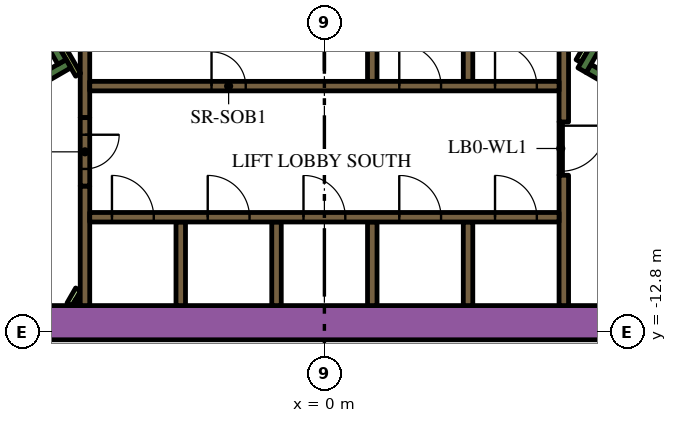
"""IFC4 building model, lengths in metres.
Left out: names, types, materials, properties, quantities, classifications, styles, units other than length and angle.
Written with IfcOpenShell. Run it as: python <this file> out.ifc"""

import sys

from ifc_helpers import new_model, si_unit, direction, frame, frame_2d, origin, place, context, subcontext, project, spatial, rectangle, extrude, element, fill, save


model = new_model("IFC4")
c1 = context("Model", 3, precision=1e-05, world=origin(), true_north=direction((0.0, 1.0)))
c2 = subcontext(c1, "Body", "Model", "MODEL_VIEW")
j1 = project(units=[si_unit("LENGTHUNIT", "METRE"), si_unit("PLANEANGLEUNIT", "RADIAN")], contexts=[c1])
p1 = place(None, origin())
s1 = spatial("IfcSite", under=j1, at=p1, CompositionType="ELEMENT")
p2 = place(p1, origin())
s2 = spatial("IfcBuilding", under=s1, at=p2, CompositionType="ELEMENT")
p3 = place(p2, frame((0.0, 0.0, 87.6)))
s3 = spatial("IfcBuildingStorey", under=s2, at=p3, CompositionType="ELEMENT", Elevation=87.6)
p4 = place(p3, frame((-12.019, -12.55, 0.0), z_axis=(0.0, 0.0, 1.0), x_axis=(1.0, 0.0, 0.0)))
e1 = element("IfcWall", 1, at=p4, inside=s3, PredefinedType="SOLIDWALL", context=c2, shape_type="SweptSolid", body=[
    extrude(rectangle(XDim=21.63, YDim=0.9, at=frame_2d((10.815, 0.0))), origin(), (0.0, 0.0, 1.0), 3.9),
])
p5 = place(p3, frame((12.84, -9.261, 0.0), z_axis=(0.0, 0.0, 1.0), x_axis=(-0.866013990052, 0.500019768644, 0.0)))
e2 = element("IfcWall", 2, at=p5, inside=s3, PredefinedType="SOLIDWALL", context=c2, shape_type="SweptSolid", body=[
    extrude(rectangle(XDim=6.8, YDim=0.25, at=frame_2d((3.4, 0.0))), origin(), (0.0, 0.0, 1.0), 3.9),
])
p6 = place(p3, frame((6.78, -5.906, 0.0), z_axis=(0.0, 0.0, 1.0), x_axis=(0.500223362819, 0.865896406789, 0.0)))
e3 = element("IfcWall", 3, at=p6, inside=s3, PredefinedType="SOLIDWALL", context=c2, shape_type="SweptSolid", body=[
    extrude(rectangle(XDim=0.675, YDim=0.25, at=frame_2d((0.337, 0.0))), origin(), (0.0, 0.0, 1.0), 3.9),
])
p7 = place(p3, frame((-12.84, -9.261, 0.0), z_axis=(0.0, 0.0, 1.0), x_axis=(0.866016039709, 0.500016218704, 0.0)))
e4 = element("IfcWall", 4, at=p7, inside=s3, PredefinedType="SOLIDWALL", context=c2, shape_type="SweptSolid", body=[
    extrude(rectangle(XDim=7.05, YDim=0.25, at=frame_2d((3.525, 0.0))), origin(), (0.0, 0.0, 1.0), 3.9),
])
p8 = place(p3, frame((-6.905, -5.69, 0.0), z_axis=(0.0, 0.0, 1.0), x_axis=(-0.500402024738, 0.865793170242, 0.0)))
e5 = element("IfcWall", 5, at=p8, inside=s3, PredefinedType="SOLIDWALL", context=c2, shape_type="SweptSolid", body=[
    extrude(rectangle(XDim=0.425, YDim=0.25, at=frame_2d((0.212, 0.0))), origin(), (0.0, 0.0, 1.0), 3.9),
])
p9 = place(p3, frame((-3.78, -12.1, 0.0), z_axis=(0.0, 0.0, 1.0), x_axis=(0.0, 1.0, 0.0)))
e6 = element("IfcWall", 6, at=p9, inside=s3, PredefinedType="SOLIDWALL", context=c2, shape_type="SweptSolid", body=[
    extrude(rectangle(XDim=2.2, YDim=0.25, at=frame_2d((1.1, 0.0))), origin(), (0.0, 0.0, 1.0), 3.9),
])
p10 = place(p3, frame((-6.3, -12.1, 0.0), z_axis=(0.0, 0.0, 1.0), x_axis=(0.0, 1.0, 0.0)))
e7 = element("IfcWall", 7, at=p10, inside=s3, PredefinedType="SOLIDWALL", context=c2, shape_type="SweptSolid", body=[
    extrude(rectangle(XDim=3.146, YDim=0.25, at=frame_2d((1.573, 0.0))), origin(), (0.0, 0.0, 1.0), 3.9),
])
p11 = place(p3, frame((6.3, -8.67, 0.0), z_axis=(0.0, 0.0, 1.0), x_axis=(0.0, -1.0, 0.0)))
e8 = element("IfcWall", 8, at=p11, inside=s3, PredefinedType="SOLIDWALL", context=c2, shape_type="SweptSolid", body=[
    extrude(rectangle(XDim=3.43, YDim=0.25, at=frame_2d((1.715, 0.0))), origin(), (0.0, 0.0, 1.0), 3.9),
])
p12 = place(p3, frame((6.3, -7.268, 0.0), z_axis=(0.0, 0.0, 1.0), x_axis=(0.0, 1.0, 0.0)))
e9 = element("IfcWall", 9, at=p12, inside=s3, PredefinedType="SOLIDWALL", context=c2, shape_type="SweptSolid", body=[
    extrude(rectangle(XDim=3.268, YDim=0.25, at=frame_2d((1.634, 0.0))), origin(), (0.0, 0.0, 1.0), 3.9),
])
for number, where, z_axis, x_axis in (
    (10, (3.78, -4.0, 0.0), (0.0, 0.0, 1.0), (0.0, -1.0, 0.0)),
    (11, (1.26, -4.0, 0.0), (0.0, 0.0, 1.0), (0.0, -1.0, 0.0)),
):
    element("IfcWall", number, at=place(p3, frame(where, z_axis=z_axis, x_axis=x_axis)), inside=s3, PredefinedType="SOLIDWALL", context=c2, shape_type="SweptSolid", body=[
        extrude(rectangle(XDim=2.2, YDim=0.25, at=frame_2d((1.1, 0.0))), origin(), (0.0, 0.0, 1.0), 3.9),
    ])
p13 = place(p3, frame((-6.3, -4.0, 0.0), z_axis=(0.0, 0.0, 1.0), x_axis=(0.0, -1.0, 0.0)))
e12 = element("IfcWall", 12, at=p13, inside=s3, PredefinedType="SOLIDWALL", context=c2, shape_type="SweptSolid", body=[
    extrude(rectangle(XDim=3.154, YDim=0.25, at=frame_2d((1.577, 0.0))), origin(), (0.0, 0.0, 1.0), 3.9),
])
for number, where, z_axis, x_axis in (
    (13, (3.78, -12.1, 0.0), (0.0, 0.0, 1.0), (0.0, 1.0, 0.0)),
    (14, (1.26, -12.1, 0.0), (0.0, 0.0, 1.0), (0.0, 1.0, 0.0)),
    (15, (-1.26, -12.1, 0.0), (0.0, 0.0, 1.0), (0.0, 1.0, 0.0)),
):
    element("IfcWall", number, at=place(p3, frame(where, z_axis=z_axis, x_axis=x_axis)), inside=s3, PredefinedType="SOLIDWALL", context=c2, shape_type="SweptSolid", body=[
        extrude(rectangle(XDim=2.2, YDim=0.25, at=frame_2d((1.1, 0.0))), origin(), (0.0, 0.0, 1.0), 3.9),
    ])
p14 = place(p3, frame((-6.708, -12.068, 0.0), z_axis=(0.0, 0.0, 1.0), x_axis=(0.500000789788, 0.8660249478, 0.0)))
e16 = element("IfcWall", 16, at=p14, inside=s3, PredefinedType="PARTITIONING", context=c2, shape_type="SweptSolid", body=[
    extrude(rectangle(XDim=0.456, YDim=0.15, at=frame_2d((0.228, 0.0))), origin(), (0.0, 0.0, 1.0), 2.75),
])
p15 = place(p3, frame((-6.534, -12.068, 0.0), z_axis=(0.0, 0.0, 1.0), x_axis=(0.500240224089, 0.865886665912, 0.0)))
e17 = element("IfcWall", 17, at=p15, inside=s3, PredefinedType="PARTITIONING", context=c2, shape_type="SweptSolid", body=[
    extrude(rectangle(XDim=0.109, YDim=0.15, at=frame_2d((0.054, 0.0))), origin(), (0.0, 0.0, 1.0), 2.75),
])
p16 = place(p3, frame((-6.48, -6.027, 0.0), z_axis=(0.0, 0.0, 1.0), x_axis=(-0.499927229454, 0.866067413802, 0.0)))
e18 = element("IfcWall", 18, at=p16, inside=s3, PredefinedType="PARTITIONING", context=c2, shape_type="SweptSolid", body=[
    extrude(rectangle(XDim=0.929, YDim=0.15, at=frame_2d((0.464, 0.0))), origin(), (0.0, 0.0, 1.0), 3.9),
])
p17 = place(p3, frame((6.945, -5.222, 0.0), z_axis=(0.0, 0.0, 1.0), x_axis=(-0.499818422106, -0.866130212453, 0.0)))
e19 = element("IfcWall", 19, at=p17, inside=s3, PredefinedType="PARTITIONING", context=c2, shape_type="SweptSolid", body=[
    extrude(rectangle(XDim=0.514, YDim=0.15, at=frame_2d((0.257, 0.0))), origin(), (0.0, 0.0, 1.0), 2.75),
])
p18 = place(p3, frame((-6.175, -9.775, 0.0), z_axis=(0.0, 0.0, 1.0), x_axis=(1.0, 0.0, 0.0)))
e20 = element("IfcWall", 20, at=p18, inside=s3, PredefinedType="SOLIDWALL", context=c2, shape_type="SweptSolid", body=[
    extrude(rectangle(XDim=12.35, YDim=0.25, at=frame_2d((6.175, 0.0))), origin(), (0.0, 0.0, 1.0), 3.9),
])
p19 = place(p18, frame((0.585, 0.0, 0.0)))
e21 = element("IfcOpeningElement", 21, at=p19, cuts=e20, PredefinedType="OPENING", context=c2, shape_type="SweptSolid", body=[
    extrude(rectangle(XDim=1.1, YDim=2.1, at=frame_2d((0.55, 1.05))), frame((0.0, 0.135, 0.0), z_axis=(0.0, -1.0, 0.0), x_axis=(1.0, 0.0, 0.0)), (0.0, 0.0, 1.0), 0.27),
])
p20 = place(p18, frame((3.105, 0.0, 0.0)))
e22 = element("IfcOpeningElement", 22, at=p20, cuts=e20, PredefinedType="OPENING", context=c2, shape_type="SweptSolid", body=[
    extrude(rectangle(XDim=1.1, YDim=2.1, at=frame_2d((0.55, 1.05))), frame((0.0, 0.135, 0.0), z_axis=(0.0, -1.0, 0.0), x_axis=(1.0, 0.0, 0.0)), (0.0, 0.0, 1.0), 0.27),
])
p21 = place(p18, frame((5.625, 0.0, 0.0)))
e23 = element("IfcOpeningElement", 23, at=p21, cuts=e20, PredefinedType="OPENING", context=c2, shape_type="SweptSolid", body=[
    extrude(rectangle(XDim=1.1, YDim=2.1, at=frame_2d((0.55, 1.05))), frame((0.0, 0.135, 0.0), z_axis=(0.0, -1.0, 0.0), x_axis=(1.0, 0.0, 0.0)), (0.0, 0.0, 1.0), 0.27),
])
p22 = place(p18, frame((8.145, 0.0, 0.0)))
e24 = element("IfcOpeningElement", 24, at=p22, cuts=e20, PredefinedType="OPENING", context=c2, shape_type="SweptSolid", body=[
    extrude(rectangle(XDim=1.1, YDim=2.1, at=frame_2d((0.55, 1.05))), frame((0.0, 0.135, 0.0), z_axis=(0.0, -1.0, 0.0), x_axis=(1.0, 0.0, 0.0)), (0.0, 0.0, 1.0), 0.27),
])
p23 = place(p18, frame((10.665, 0.0, 0.0)))
e25 = element("IfcOpeningElement", 25, at=p23, cuts=e20, PredefinedType="OPENING", context=c2, shape_type="SweptSolid", body=[
    extrude(rectangle(XDim=1.1, YDim=2.1, at=frame_2d((0.55, 1.05))), frame((0.0, 0.135, 0.0), z_axis=(0.0, -1.0, 0.0), x_axis=(1.0, 0.0, 0.0)), (0.0, 0.0, 1.0), 0.27),
])
p24 = place(p3, frame((-6.175, -6.325, 0.0), z_axis=(0.0, 0.0, 1.0), x_axis=(1.0, 0.0, 0.0)))
e26 = element("IfcWall", 26, at=p24, inside=s3, PredefinedType="SOLIDWALL", context=c2, shape_type="SweptSolid", body=[
    extrude(rectangle(XDim=12.35, YDim=0.25, at=frame_2d((6.175, 0.0))), origin(), (0.0, 0.0, 1.0), 3.9),
])
p25 = place(p24, frame((3.205, 0.0, 0.0)))
e27 = element("IfcOpeningElement", 27, at=p25, cuts=e26, PredefinedType="OPENING", context=c2, shape_type="SweptSolid", body=[
    extrude(rectangle(XDim=0.9, YDim=2.1, at=frame_2d((0.45, 1.05))), frame((0.0, 0.135, 0.0), z_axis=(0.0, -1.0, 0.0), x_axis=(1.0, 0.0, 0.0)), (0.0, 0.0, 1.0), 0.27),
])
p26 = place(p24, frame((8.145, 0.0, 0.0)))
e28 = element("IfcOpeningElement", 28, at=p26, cuts=e26, PredefinedType="OPENING", context=c2, shape_type="SweptSolid", body=[
    extrude(rectangle(XDim=1.1, YDim=2.1, at=frame_2d((0.55, 1.05))), frame((0.0, 0.135, 0.0), z_axis=(0.0, -1.0, 0.0), x_axis=(1.0, 0.0, 0.0)), (0.0, 0.0, 1.0), 0.27),
])
p27 = place(p24, frame((10.665, 0.0, 0.0)))
e29 = element("IfcOpeningElement", 29, at=p27, cuts=e26, PredefinedType="OPENING", context=c2, shape_type="SweptSolid", body=[
    extrude(rectangle(XDim=1.1, YDim=2.1, at=frame_2d((0.55, 1.05))), frame((0.0, 0.135, 0.0), z_axis=(0.0, -1.0, 0.0), x_axis=(1.0, 0.0, 0.0)), (0.0, 0.0, 1.0), 0.27),
])
p28 = place(p3, frame((-6.3, -7.154, 0.0), z_axis=(0.0, 0.0, 1.0), x_axis=(0.0, -1.0, 0.0)))
e30 = element("IfcWall", 30, at=p28, inside=s3, PredefinedType="SOLIDWALL", context=c2, shape_type="SweptSolid", body=[
    extrude(rectangle(XDim=1.8, YDim=0.25, at=frame_2d((0.9, 0.0))), origin(), (0.0, 0.0, 1.0), 3.9),
])
p29 = place(p28, frame((0.45, 0.0, 0.0)))
e31 = element("IfcOpeningElement", 31, at=p29, cuts=e30, PredefinedType="OPENING", context=c2, shape_type="SweptSolid", body=[
    extrude(rectangle(XDim=0.9, YDim=2.1, at=frame_2d((0.45, 1.05))), frame((0.0, 0.135, 0.0), z_axis=(0.0, -1.0, 0.0), x_axis=(1.0, 0.0, 0.0)), (0.0, 0.0, 1.0), 0.27),
])
p30 = place(p3, frame((6.22, -7.266, 0.0), z_axis=(0.0, 0.0, 1.0), x_axis=(0.0, -1.0, 0.0)))
e32 = element("IfcWall", 32, at=p30, inside=s3, PredefinedType="PARTITIONING", context=c2, shape_type="SweptSolid", body=[
    extrude(rectangle(XDim=1.4, YDim=0.09, at=frame_2d((0.7, 0.0))), origin(), (0.0, 0.0, 1.0), 2.75),
])
p31 = place(p30, frame((0.1, 0.0, 0.0)))
e33 = element("IfcOpeningElement", 33, at=p31, cuts=e32, PredefinedType="OPENING", context=c2, shape_type="SweptSolid", body=[
    extrude(rectangle(XDim=1.2, YDim=2.1, at=frame_2d((0.6, 1.05))), frame((0.0, 0.055, 0.0), z_axis=(0.0, -1.0, 0.0), x_axis=(1.0, 0.0, 0.0)), (0.0, 0.0, 1.0), 0.11),
])
p32 = place(p19, origin())
e34 = element("IfcDoor", 34, at=p32, inside=s3, OperationType="DOUBLE_DOOR_SLIDING", PredefinedType="DOOR", context=c2, shape_type="SweptSolid", body=[
    extrude(rectangle(XDim=1.1, YDim=2.1, at=frame_2d((0.55, 1.05))), frame((0.0, 0.025, 0.0), z_axis=(0.0, -1.0, 0.0), x_axis=(1.0, 0.0, 0.0)), (0.0, 0.0, 1.0), 0.05),
])
fill(e21, e34)
p33 = place(p20, origin())
e35 = element("IfcDoor", 35, at=p33, inside=s3, OperationType="DOUBLE_DOOR_SLIDING", PredefinedType="DOOR", context=c2, shape_type="SweptSolid", body=[
    extrude(rectangle(XDim=1.1, YDim=2.1, at=frame_2d((0.55, 1.05))), frame((0.0, 0.025, 0.0), z_axis=(0.0, -1.0, 0.0), x_axis=(1.0, 0.0, 0.0)), (0.0, 0.0, 1.0), 0.05),
])
fill(e22, e35)
p34 = place(p21, origin())
e36 = element("IfcDoor", 36, at=p34, inside=s3, OperationType="DOUBLE_DOOR_SLIDING", PredefinedType="DOOR", context=c2, shape_type="SweptSolid", body=[
    extrude(rectangle(XDim=1.1, YDim=2.1, at=frame_2d((0.55, 1.05))), frame((0.0, 0.025, 0.0), z_axis=(0.0, -1.0, 0.0), x_axis=(1.0, 0.0, 0.0)), (0.0, 0.0, 1.0), 0.05),
])
fill(e23, e36)
p35 = place(p22, origin())
e37 = element("IfcDoor", 37, at=p35, inside=s3, OperationType="DOUBLE_DOOR_SLIDING", PredefinedType="DOOR", context=c2, shape_type="SweptSolid", body=[
    extrude(rectangle(XDim=1.1, YDim=2.1, at=frame_2d((0.55, 1.05))), frame((0.0, 0.025, 0.0), z_axis=(0.0, -1.0, 0.0), x_axis=(1.0, 0.0, 0.0)), (0.0, 0.0, 1.0), 0.05),
])
fill(e24, e37)
p36 = place(p23, origin())
e38 = element("IfcDoor", 38, at=p36, inside=s3, OperationType="DOUBLE_DOOR_SLIDING", PredefinedType="DOOR", context=c2, shape_type="SweptSolid", body=[
    extrude(rectangle(XDim=1.1, YDim=2.1, at=frame_2d((0.55, 1.05))), frame((0.0, 0.025, 0.0), z_axis=(0.0, -1.0, 0.0), x_axis=(1.0, 0.0, 0.0)), (0.0, 0.0, 1.0), 0.05),
])
fill(e25, e38)
p37 = place(p25, origin())
e39 = element("IfcDoor", 39, at=p37, inside=s3, OperationType="SINGLE_SWING_LEFT", PredefinedType="DOOR", context=c2, shape_type="SweptSolid", body=[
    extrude(rectangle(XDim=0.9, YDim=2.1, at=frame_2d((0.45, 1.05))), frame((0.0, 0.025, 0.0), z_axis=(0.0, -1.0, 0.0), x_axis=(1.0, 0.0, 0.0)), (0.0, 0.0, 1.0), 0.05),
])
fill(e27, e39)
p38 = place(p26, origin())
e40 = element("IfcDoor", 40, at=p38, inside=s3, OperationType="DOUBLE_DOOR_SLIDING", PredefinedType="DOOR", context=c2, shape_type="SweptSolid", body=[
    extrude(rectangle(XDim=1.1, YDim=2.1, at=frame_2d((0.55, 1.05))), frame((0.0, 0.025, 0.0), z_axis=(0.0, -1.0, 0.0), x_axis=(1.0, 0.0, 0.0)), (0.0, 0.0, 1.0), 0.05),
])
fill(e28, e40)
p39 = place(p27, origin())
e41 = element("IfcDoor", 41, at=p39, inside=s3, OperationType="DOUBLE_DOOR_SLIDING", PredefinedType="DOOR", context=c2, shape_type="SweptSolid", body=[
    extrude(rectangle(XDim=1.1, YDim=2.1, at=frame_2d((0.55, 1.05))), frame((0.0, 0.025, 0.0), z_axis=(0.0, -1.0, 0.0), x_axis=(1.0, 0.0, 0.0)), (0.0, 0.0, 1.0), 0.05),
])
fill(e29, e41)
p40 = place(p29, origin())
e42 = element("IfcDoor", 42, at=p40, inside=s3, OperationType="SINGLE_SWING_LEFT", PredefinedType="DOOR", context=c2, shape_type="SweptSolid", body=[
    extrude(rectangle(XDim=0.9, YDim=2.1, at=frame_2d((0.45, 1.05))), frame((0.0, 0.025, 0.0), z_axis=(0.0, -1.0, 0.0), x_axis=(1.0, 0.0, 0.0)), (0.0, 0.0, 1.0), 0.05),
])
fill(e31, e42)
p41 = place(p31, origin())
e43 = element("IfcDoor", 43, at=p41, inside=s3, OperationType="SINGLE_SWING_LEFT", PredefinedType="DOOR", context=c2, shape_type="SweptSolid", body=[
    extrude(rectangle(XDim=1.2, YDim=2.1, at=frame_2d((0.6, 1.05))), frame((0.0, 0.025, 0.0), z_axis=(0.0, -1.0, 0.0), x_axis=(1.0, 0.0, 0.0)), (0.0, 0.0, 1.0), 0.05),
])
fill(e33, e43)
save(model, sys.argv[1])
